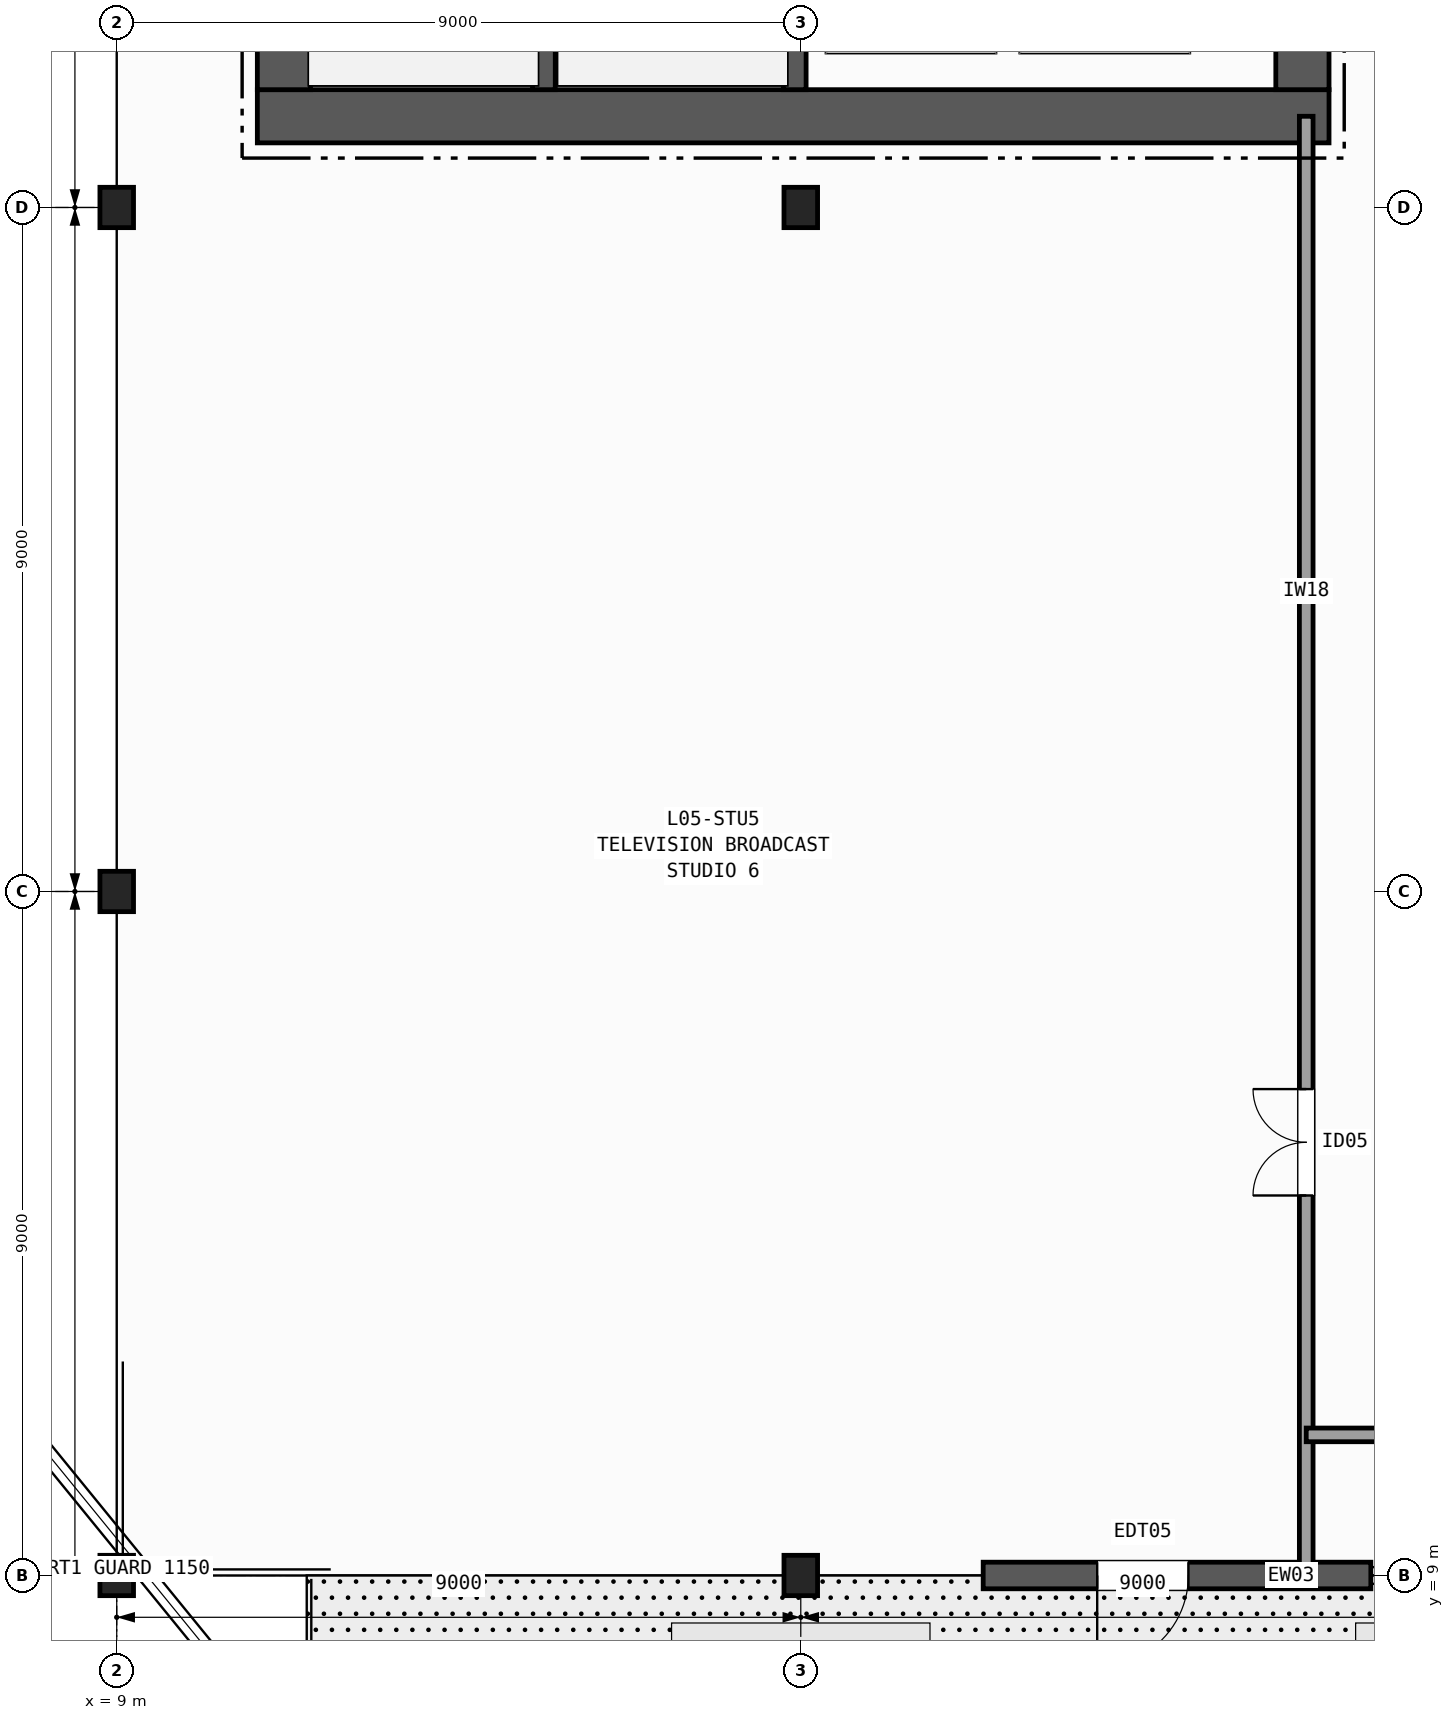
"""IFC4 building model, lengths in metres.
Left out: names, types, materials, properties, quantities, classifications, styles, units other than length and angle.
Written with IfcOpenShell. Run it as: python <this file> out.ifc"""

import sys

from ifc_helpers import new_model, si_unit, direction, frame, frame_2d, origin, origin_2d, place, context, subcontext, project, spatial, rectangle, i_section, extrude, element, fill, save


model = new_model("IFC4")
c1 = context("Model", 3, precision=1e-05, world=origin(), true_north=direction((0.0, 1.0)))
c2 = subcontext(c1, "Body", "Model", "MODEL_VIEW")
j1 = project(units=[si_unit("LENGTHUNIT", "METRE"), si_unit("PLANEANGLEUNIT", "RADIAN")], contexts=[c1])
p1 = place(None, origin())
s1 = spatial("IfcSite", under=j1, at=p1, CompositionType="ELEMENT")
p2 = place(p1, origin())
s2 = spatial("IfcBuilding", under=s1, at=p2, CompositionType="ELEMENT")
p3 = place(p2, frame((0.0, 0.0, 26.0)))
s3 = spatial("IfcBuildingStorey", under=s2, at=p3, CompositionType="ELEMENT", Elevation=26.0)
for number, where, z_axis, x_axis in (
    (1, (9.0, 9.0, 0.0), (0.0, 0.0, 1.0), (1.0, 0.0, 0.0)),
    (2, (9.0, 18.0, 0.0), (0.0, 0.0, 1.0), (1.0, 0.0, 0.0)),
    (3, (9.0, 27.0, 0.0), (0.0, 0.0, 1.0), (1.0, 0.0, 0.0)),
    (4, (18.0, 9.0, 0.0), (0.0, 0.0, 1.0), (1.0, 0.0, 0.0)),
    (5, (18.0, 27.0, 0.0), (0.0, 0.0, 1.0), (1.0, 0.0, 0.0)),
):
    element("IfcColumn", number, at=place(p3, frame(where, z_axis=z_axis, x_axis=x_axis)), inside=s3, PredefinedType="COLUMN", context=c2, shape_type="SweptSolid", body=[
        extrude(i_section(OverallWidth=0.442, OverallDepth=0.531, WebThickness=0.066, FlangeThickness=0.106, FilletRadius=0.015, at=origin_2d()), origin(), (0.0, 0.0, 1.0), 4.8),
    ])
p4 = place(p3, frame((25.5, 9.0, 0.0), z_axis=(0.0, 0.0, 1.0), x_axis=(-1.0, 0.0, 0.0)))
e6 = element("IfcWall", 6, at=p4, inside=s3, PredefinedType="SOLIDWALL", context=c2, shape_type="SweptSolid", body=[
    extrude(rectangle(XDim=5.1, YDim=0.35, at=frame_2d((2.55, 0.0))), origin(), (0.0, 0.0, 1.0), 4.44),
])
p5 = place(p4, frame((2.4, 0.0, 0.0)))
e7 = element("IfcOpeningElement", 7, at=p5, cuts=e6, PredefinedType="OPENING", context=c2, shape_type="SweptSolid", body=[
    extrude(rectangle(XDim=1.2, YDim=2.2, at=frame_2d((0.6, 1.1))), frame((0.0, 0.185, 0.0), z_axis=(0.0, -1.0, 0.0), x_axis=(1.0, 0.0, 0.0)), (0.0, 0.0, 1.0), 0.37),
])
p6 = place(p3, frame((10.85, 28.2, 0.0), z_axis=(0.0, 0.0, 1.0), x_axis=(1.0, 0.0, 0.0)))
e8 = element("IfcWall", 8, at=p6, inside=s3, PredefinedType="SHEAR", context=c2, shape_type="SweptSolid", body=[
    extrude(rectangle(XDim=14.1, YDim=0.7, at=frame_2d((7.05, 0.0))), origin(), (0.0, 0.0, 1.0), 4.44),
])
p7 = place(p3, frame((11.2, 42.05, 0.0), z_axis=(0.0, 0.0, 1.0), x_axis=(0.0, -1.0, 0.0)))
e9 = element("IfcWall", 9, at=p7, inside=s3, PredefinedType="SHEAR", context=c2, shape_type="SweptSolid", body=[
    extrude(rectangle(XDim=13.5, YDim=0.7, at=frame_2d((6.75, 0.0))), origin(), (0.0, 0.0, 1.0), 4.44),
])
p8 = place(p3, frame((24.6, 28.55, 0.0), z_axis=(0.0, 0.0, 1.0), x_axis=(0.0, 1.0, 0.0)))
e10 = element("IfcWall", 10, at=p8, inside=s3, PredefinedType="SHEAR", context=c2, shape_type="SweptSolid", body=[
    extrude(rectangle(XDim=13.5, YDim=0.7, at=frame_2d((6.75, 0.0))), origin(), (0.0, 0.0, 1.0), 4.44),
])
p9 = place(p8, frame((3.25, 0.0, 0.0)))
e11 = element("IfcOpeningElement", 11, at=p9, cuts=e10, PredefinedType="OPENING", context=c2, shape_type="SweptSolid", body=[
    extrude(rectangle(XDim=1.5, YDim=2.2, at=frame_2d((0.75, 1.1))), frame((0.0, 0.36, 0.0), z_axis=(0.0, -1.0, 0.0), x_axis=(1.0, 0.0, 0.0)), (0.0, 0.0, 1.0), 0.72),
])
p10 = place(p8, frame((9.85, 0.0, 0.0)))
e12 = element("IfcOpeningElement", 12, at=p10, cuts=e10, PredefinedType="OPENING", context=c2, shape_type="SweptSolid", body=[
    extrude(rectangle(XDim=0.9, YDim=2.1, at=frame_2d((0.45, 1.05))), frame((0.0, 0.36, 0.0), z_axis=(0.0, -1.0, 0.0), x_axis=(1.0, 0.0, 0.0)), (0.0, 0.0, 1.0), 0.72),
])
p11 = place(p3, frame((14.62, 28.55, 0.0), z_axis=(0.0, 0.0, 1.0), x_axis=(0.0, 1.0, 0.0)))
e13 = element("IfcWall", 13, at=p11, inside=s3, PredefinedType="SHEAR", context=c2, shape_type="SweptSolid", body=[
    extrude(rectangle(XDim=8.9, YDim=0.3, at=frame_2d((4.45, 0.0))), origin(), (0.0, 0.0, 1.0), 4.44),
])
p12 = place(p3, frame((17.92, 42.05, 0.0), z_axis=(0.0, 0.0, 1.0), x_axis=(0.0, -1.0, 0.0)))
e14 = element("IfcWall", 14, at=p12, inside=s3, PredefinedType="SHEAR", context=c2, shape_type="SweptSolid", body=[
    extrude(rectangle(XDim=13.5, YDim=0.3, at=frame_2d((6.75, 0.0))), origin(), (0.0, 0.0, 1.0), 4.44),
])
p13 = place(p12, frame((1.875, 0.0, 0.0)))
e15 = element("IfcOpeningElement", 15, at=p13, cuts=e14, PredefinedType="OPENING", context=c2, shape_type="SweptSolid", body=[
    extrude(rectangle(XDim=1.15, YDim=2.15, at=frame_2d((0.575, 1.075))), frame((0.0, 0.16, 0.0), z_axis=(0.0, -1.0, 0.0), x_axis=(1.0, 0.0, 0.0)), (0.0, 0.0, 1.0), 0.32),
])
p14 = place(p3, frame((24.65, 9.0, 0.0), z_axis=(0.0, 0.0, 1.0), x_axis=(0.0, 1.0, 0.0)))
e16 = element("IfcWall", 16, at=p14, inside=s3, PredefinedType="PARTITIONING", context=c2, shape_type="SweptSolid", body=[
    extrude(rectangle(XDim=19.2, YDim=0.18, at=frame_2d((9.6, 0.0))), origin(), (0.0, 0.0, 1.0), 3.493),
])
p15 = place(p14, frame((5.0, 0.0, 0.0)))
e17 = element("IfcOpeningElement", 17, at=p15, cuts=e16, PredefinedType="OPENING", context=c2, shape_type="SweptSolid", body=[
    extrude(rectangle(XDim=1.4, YDim=2.15, at=frame_2d((0.7, 1.075))), frame((0.0, 0.1, 0.0), z_axis=(0.0, -1.0, 0.0), x_axis=(1.0, 0.0, 0.0)), (0.0, 0.0, 1.0), 0.2),
])
p16 = place(p3, frame((24.65, 10.85, 0.0), z_axis=(0.0, 0.0, 1.0), x_axis=(1.0, 0.0, 0.0)))
e18 = element("IfcWall", 18, at=p16, inside=s3, PredefinedType="PARTITIONING", context=c2, shape_type="SweptSolid", body=[
    extrude(rectangle(XDim=38.35, YDim=0.18, at=frame_2d((19.175, 0.0))), origin(), (0.0, 0.0, 1.0), 2.62),
])
p17 = place(p16, frame((2.0, 0.0, 0.0)))
e19 = element("IfcOpeningElement", 19, at=p17, cuts=e18, PredefinedType="OPENING", context=c2, shape_type="SweptSolid", body=[
    extrude(rectangle(XDim=1.2, YDim=2.15, at=frame_2d((0.6, 1.075))), frame((0.0, 0.1, 0.0), z_axis=(0.0, -1.0, 0.0), x_axis=(1.0, 0.0, 0.0)), (0.0, 0.0, 1.0), 0.2),
])
p18 = place(p5, origin())
e20 = element("IfcDoor", 20, at=p18, inside=s3, OperationType="SINGLE_SWING_RIGHT", PredefinedType="DOOR", context=c2, shape_type="SweptSolid", body=[
    extrude(rectangle(XDim=1.2, YDim=2.2, at=frame_2d((0.6, 1.1))), frame((0.0, 0.025, 0.0), z_axis=(0.0, -1.0, 0.0), x_axis=(1.0, 0.0, 0.0)), (0.0, 0.0, 1.0), 0.05),
])
fill(e7, e20)
p19 = place(p15, origin())
e21 = element("IfcDoor", 21, at=p19, inside=s3, OperationType="DOUBLE_DOOR_SINGLE_SWING", PredefinedType="DOOR", context=c2, shape_type="SweptSolid", body=[
    extrude(rectangle(XDim=1.4, YDim=2.15, at=frame_2d((0.7, 1.075))), frame((0.0, 0.025, 0.0), z_axis=(0.0, -1.0, 0.0), x_axis=(1.0, 0.0, 0.0)), (0.0, 0.0, 1.0), 0.05),
])
fill(e17, e21)
save(model, sys.argv[1])
